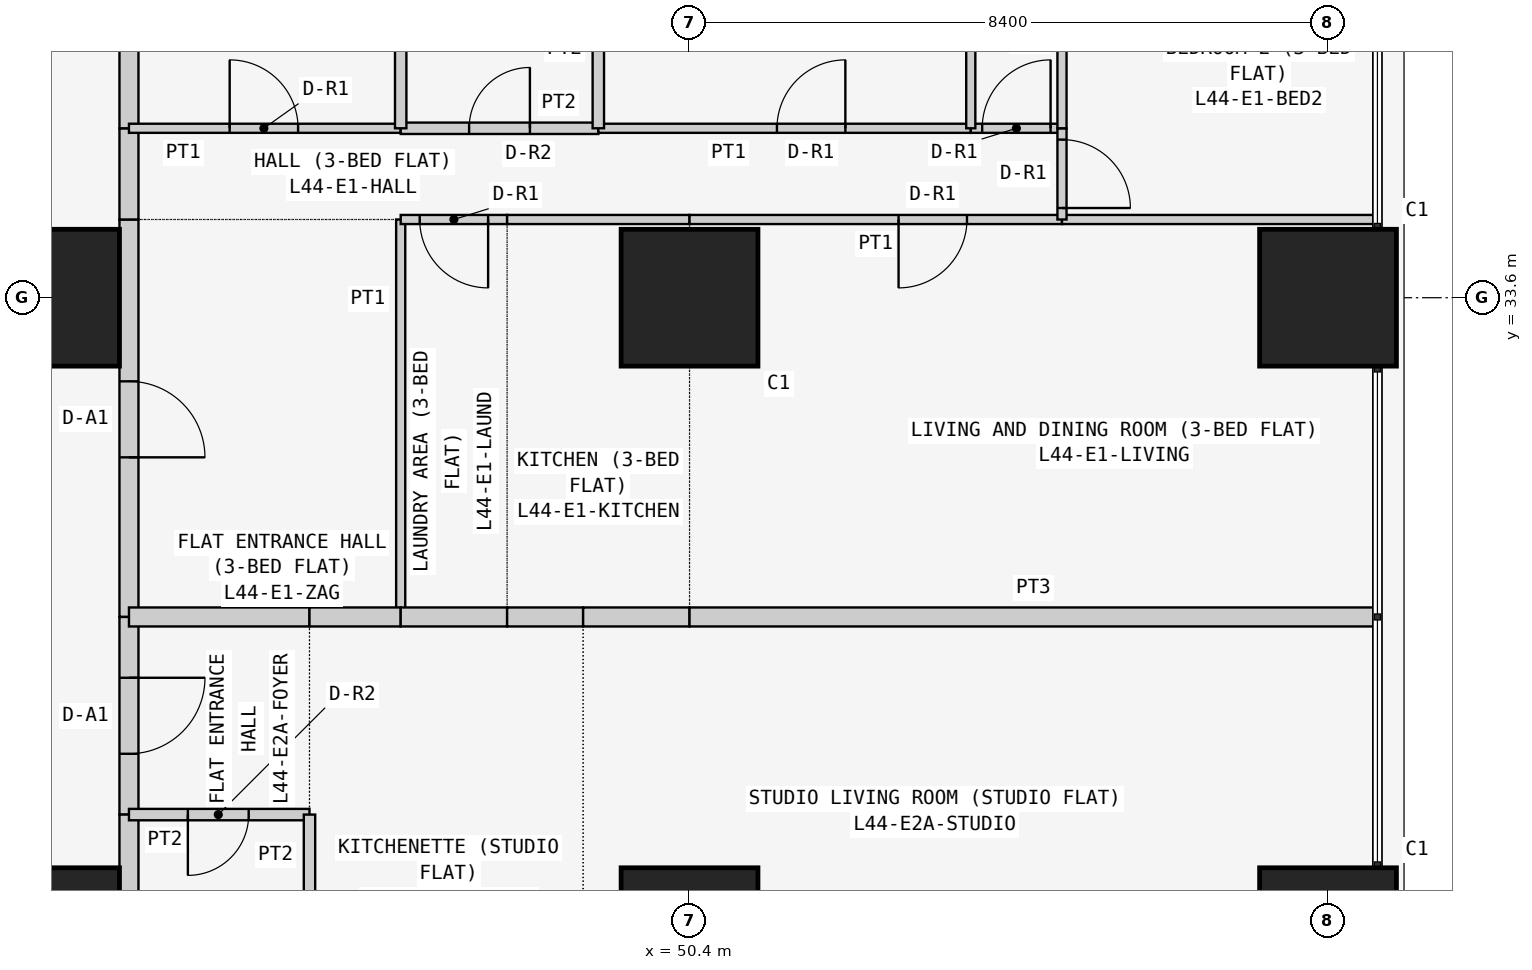
"""IFC4 building model, lengths in metres.
Left out: names, types, materials, properties, quantities, classifications, styles, units other than length and angle.
Written with IfcOpenShell. Run it as: python <this file> out.ifc"""

import sys

from ifc_helpers import new_model, si_unit, direction, frame, frame_2d, origin, origin_2d, place, context, subcontext, project, spatial, rectangle, extrude, element, fill, save


model = new_model("IFC4")
c1 = context("Model", 3, precision=1e-05, world=origin(), true_north=direction((0.0, 1.0)))
c2 = subcontext(c1, "Body", "Model", "MODEL_VIEW")
j1 = project(units=[si_unit("LENGTHUNIT", "METRE"), si_unit("PLANEANGLEUNIT", "RADIAN")], contexts=[c1])
p1 = place(None, origin())
s1 = spatial("IfcSite", under=j1, at=p1, CompositionType="ELEMENT")
p2 = place(p1, origin())
s2 = spatial("IfcBuilding", under=s1, at=p2, CompositionType="ELEMENT")
p3 = place(p2, frame((0.0, 0.0, 170.1)))
s3 = spatial("IfcBuildingStorey", under=s2, at=p3, CompositionType="ELEMENT", Elevation=170.1)
for number, where, z_axis, x_axis in (
    (1, (42.0, 25.2, 0.0), (0.0, 0.0, 1.0), (1.0, 0.0, 0.0)),
    (2, (42.0, 33.6, 0.0), (0.0, 0.0, 1.0), (1.0, 0.0, 0.0)),
    (3, (50.4, 25.2, 0.0), (0.0, 0.0, 1.0), (1.0, 0.0, 0.0)),
    (4, (50.4, 33.6, 0.0), (0.0, 0.0, 1.0), (1.0, 0.0, 0.0)),
    (5, (58.8, 25.2, 0.0), (0.0, 0.0, 1.0), (1.0, 0.0, 0.0)),
    (6, (58.8, 33.6, 0.0), (0.0, 0.0, 1.0), (1.0, 0.0, 0.0)),
):
    element("IfcColumn", number, at=place(p3, frame(where, z_axis=z_axis, x_axis=x_axis)), inside=s3, PredefinedType="COLUMN", context=c2, shape_type="SweptSolid", body=[
        extrude(rectangle(XDim=1.8, YDim=1.8, at=origin_2d()), origin(), (0.0, 0.0, 1.0), 3.6),
    ])
p4 = place(p3, frame((43.025, 34.629, 0.0), z_axis=(0.0, 0.0, 1.0), x_axis=(0.0, -1.0, 0.0)))
e7 = element("IfcWall", 7, at=p4, inside=s3, PredefinedType="PARTITIONING", context=c2, shape_type="SweptSolid", body=[
    extrude(rectangle(XDim=5.229, YDim=0.25, at=frame_2d((2.615, 0.0))), origin(), (0.0, 0.0, 1.0), 3.45),
])
p5 = place(p4, frame((2.129, 0.0, 0.0)))
e8 = element("IfcOpeningElement", 8, at=p5, cuts=e7, PredefinedType="OPENING", context=c2, shape_type="SweptSolid", body=[
    extrude(rectangle(XDim=1.0, YDim=2.1, at=frame_2d((0.5, 1.05))), frame((0.0, 0.135, 0.0), z_axis=(0.0, -1.0, 0.0), x_axis=(1.0, 0.0, 0.0)), (0.0, 0.0, 1.0), 0.27),
])
p6 = place(p3, frame((43.025, 35.829, 0.0), z_axis=(0.0, 0.0, 1.0), x_axis=(0.0, -1.0, 0.0)))
e9 = element("IfcWall", 9, at=p6, inside=s3, PredefinedType="PARTITIONING", context=c2, shape_type="SweptSolid", body=[
    extrude(rectangle(XDim=1.2, YDim=0.25, at=frame_2d((0.6, 0.0))), origin(), (0.0, 0.0, 1.0), 3.45),
])
p7 = place(p3, frame((43.025, 42.7, 0.0), z_axis=(0.0, 0.0, 1.0), x_axis=(0.0, -1.0, 0.0)))
e10 = element("IfcWall", 10, at=p7, inside=s3, PredefinedType="PARTITIONING", context=c2, shape_type="SweptSolid", body=[
    extrude(rectangle(XDim=6.871, YDim=0.25, at=frame_2d((3.436, 0.0))), origin(), (0.0, 0.0, 1.0), 3.45),
])
p8 = place(p3, frame((43.025, 29.4, 0.0), z_axis=(0.0, 0.0, 1.0), x_axis=(0.0, -1.0, 0.0)))
e11 = element("IfcWall", 11, at=p8, inside=s3, PredefinedType="PARTITIONING", context=c2, shape_type="SweptSolid", body=[
    extrude(rectangle(XDim=2.6, YDim=0.25, at=frame_2d((1.3, 0.0))), origin(), (0.0, 0.0, 1.0), 3.45),
])
p9 = place(p8, frame((0.8, 0.0, 0.0)))
e12 = element("IfcOpeningElement", 12, at=p9, cuts=e11, PredefinedType="OPENING", context=c2, shape_type="SweptSolid", body=[
    extrude(rectangle(XDim=1.0, YDim=2.1, at=frame_2d((0.5, 1.05))), frame((0.0, 0.135, 0.0), z_axis=(0.0, -1.0, 0.0), x_axis=(1.0, 0.0, 0.0)), (0.0, 0.0, 1.0), 0.27),
])
p10 = place(p3, frame((43.025, 26.8, 0.0), z_axis=(0.0, 0.0, 1.0), x_axis=(0.0, -1.0, 0.0)))
e13 = element("IfcWall", 13, at=p10, inside=s3, PredefinedType="PARTITIONING", context=c2, shape_type="SweptSolid", body=[
    extrude(rectangle(XDim=2.629, YDim=0.25, at=frame_2d((1.314, 0.0))), origin(), (0.0, 0.0, 1.0), 3.45),
])
p11 = place(p3, frame((46.6, 29.4, 0.0), z_axis=(0.0, 0.0, 1.0), x_axis=(0.0, 1.0, 0.0)))
e14 = element("IfcWall", 14, at=p11, inside=s3, PredefinedType="PARTITIONING", context=c2, shape_type="SweptSolid", body=[
    extrude(rectangle(XDim=5.229, YDim=0.12, at=frame_2d((2.615, 0.0))), origin(), (0.0, 0.0, 1.0), 3.45),
])
p12 = place(p3, frame((43.025, 29.4, 0.0), z_axis=(0.0, 0.0, 1.0), x_axis=(1.0, 0.0, 0.0)))
e15 = element("IfcWall", 15, at=p12, inside=s3, PredefinedType="PARTITIONING", context=c2, shape_type="SweptSolid", body=[
    extrude(rectangle(XDim=2.375, YDim=0.25, at=frame_2d((1.188, 0.0))), origin(), (0.0, 0.0, 1.0), 3.45),
])
p13 = place(p3, frame((45.4, 29.4, 0.0), z_axis=(0.0, 0.0, 1.0), x_axis=(1.0, 0.0, 0.0)))
e16 = element("IfcWall", 16, at=p13, inside=s3, PredefinedType="PARTITIONING", context=c2, shape_type="SweptSolid", body=[
    extrude(rectangle(XDim=1.2, YDim=0.25, at=frame_2d((0.6, 0.0))), origin(), (0.0, 0.0, 1.0), 3.45),
])
p14 = place(p3, frame((48.0, 34.629, 0.0), z_axis=(0.0, 0.0, 1.0), x_axis=(-1.0, 0.0, 0.0)))
e17 = element("IfcWall", 17, at=p14, inside=s3, PredefinedType="PARTITIONING", context=c2, shape_type="SweptSolid", body=[
    extrude(rectangle(XDim=1.4, YDim=0.12, at=frame_2d((0.7, 0.0))), origin(), (0.0, 0.0, 1.0), 3.45),
])
p15 = place(p14, frame((0.25, 0.0, 0.0)))
e18 = element("IfcOpeningElement", 18, at=p15, cuts=e17, PredefinedType="OPENING", context=c2, shape_type="SweptSolid", body=[
    extrude(rectangle(XDim=0.9, YDim=2.1, at=frame_2d((0.45, 1.05))), frame((0.0, 0.07, 0.0), z_axis=(0.0, -1.0, 0.0), x_axis=(1.0, 0.0, 0.0)), (0.0, 0.0, 1.0), 0.14),
])
p16 = place(p3, frame((46.6, 29.4, 0.0), z_axis=(0.0, 0.0, 1.0), x_axis=(1.0, 0.0, 0.0)))
e19 = element("IfcWall", 19, at=p16, inside=s3, PredefinedType="PARTITIONING", context=c2, shape_type="SweptSolid", body=[
    extrude(rectangle(XDim=1.4, YDim=0.25, at=frame_2d((0.7, 0.0))), origin(), (0.0, 0.0, 1.0), 3.45),
])
p17 = place(p3, frame((50.4, 34.629, 0.0), z_axis=(0.0, 0.0, 1.0), x_axis=(-1.0, 0.0, 0.0)))
e20 = element("IfcWall", 20, at=p17, inside=s3, PredefinedType="PARTITIONING", context=c2, shape_type="SweptSolid", body=[
    extrude(rectangle(XDim=2.4, YDim=0.12, at=frame_2d((1.2, 0.0))), origin(), (0.0, 0.0, 1.0), 3.45),
])
p18 = place(p3, frame((48.0, 29.4, 0.0), z_axis=(0.0, 0.0, 1.0), x_axis=(1.0, 0.0, 0.0)))
e21 = element("IfcWall", 21, at=p18, inside=s3, PredefinedType="PARTITIONING", context=c2, shape_type="SweptSolid", body=[
    extrude(rectangle(XDim=1.0, YDim=0.25, at=frame_2d((0.5, 0.0))), origin(), (0.0, 0.0, 1.0), 3.45),
])
p19 = place(p3, frame((49.0, 29.4, 0.0), z_axis=(0.0, 0.0, 1.0), x_axis=(1.0, 0.0, 0.0)))
e22 = element("IfcWall", 22, at=p19, inside=s3, PredefinedType="PARTITIONING", context=c2, shape_type="SweptSolid", body=[
    extrude(rectangle(XDim=1.4, YDim=0.25, at=frame_2d((0.7, 0.0))), origin(), (0.0, 0.0, 1.0), 3.45),
])
p20 = place(p3, frame((55.3, 34.629, 0.0), z_axis=(0.0, 0.0, 1.0), x_axis=(-1.0, 0.0, 0.0)))
e23 = element("IfcWall", 23, at=p20, inside=s3, PredefinedType="PARTITIONING", context=c2, shape_type="SweptSolid", body=[
    extrude(rectangle(XDim=4.9, YDim=0.12, at=frame_2d((2.45, 0.0))), origin(), (0.0, 0.0, 1.0), 3.45),
])
p21 = place(p20, frame((1.25, 0.0, 0.0)))
e24 = element("IfcOpeningElement", 24, at=p21, cuts=e23, PredefinedType="OPENING", context=c2, shape_type="SweptSolid", body=[
    extrude(rectangle(XDim=0.9, YDim=2.1, at=frame_2d((0.45, 1.05))), frame((0.0, 0.07, 0.0), z_axis=(0.0, -1.0, 0.0), x_axis=(1.0, 0.0, 0.0)), (0.0, 0.0, 1.0), 0.14),
])
p22 = place(p3, frame((59.45, 34.629, 0.0), z_axis=(0.0, 0.0, 1.0), x_axis=(-1.0, 0.0, 0.0)))
e25 = element("IfcWall", 25, at=p22, inside=s3, PredefinedType="PARTITIONING", context=c2, shape_type="SweptSolid", body=[
    extrude(rectangle(XDim=4.15, YDim=0.12, at=frame_2d((2.075, 0.0))), origin(), (0.0, 0.0, 1.0), 3.45),
])
p23 = place(p3, frame((50.4, 29.4, 0.0), z_axis=(0.0, 0.0, 1.0), x_axis=(1.0, 0.0, 0.0)))
e26 = element("IfcWall", 26, at=p23, inside=s3, PredefinedType="PARTITIONING", context=c2, shape_type="SweptSolid", body=[
    extrude(rectangle(XDim=9.05, YDim=0.25, at=frame_2d((4.525, 0.0))), origin(), (0.0, 0.0, 1.0), 3.45),
])
p24 = place(p3, frame((46.6, 35.829, 0.0), z_axis=(0.0, 0.0, 1.0), x_axis=(-1.0, 0.0, 0.0)))
e27 = element("IfcWall", 27, at=p24, inside=s3, PredefinedType="PARTITIONING", context=c2, shape_type="SweptSolid", body=[
    extrude(rectangle(XDim=3.575, YDim=0.12, at=frame_2d((1.788, 0.0))), origin(), (0.0, 0.0, 1.0), 3.45),
])
p25 = place(p24, frame((1.35, 0.0, 0.0)))
e28 = element("IfcOpeningElement", 28, at=p25, cuts=e27, PredefinedType="OPENING", context=c2, shape_type="SweptSolid", body=[
    extrude(rectangle(XDim=0.9, YDim=2.1, at=frame_2d((0.45, 1.05))), frame((0.0, 0.07, 0.0), z_axis=(0.0, -1.0, 0.0), x_axis=(1.0, 0.0, 0.0)), (0.0, 0.0, 1.0), 0.14),
])
p26 = place(p3, frame((49.2, 35.829, 0.0), z_axis=(0.0, 0.0, 1.0), x_axis=(-1.0, 0.0, 0.0)))
e29 = element("IfcWall", 29, at=p26, inside=s3, PredefinedType="PARTITIONING", context=c2, shape_type="SweptSolid", body=[
    extrude(rectangle(XDim=2.6, YDim=0.15, at=frame_2d((1.3, 0.0))), origin(), (0.0, 0.0, 1.0), 3.45),
])
p27 = place(p26, frame((0.9, 0.0, 0.0)))
e30 = element("IfcOpeningElement", 30, at=p27, cuts=e29, PredefinedType="OPENING", context=c2, shape_type="SweptSolid", body=[
    extrude(rectangle(XDim=0.8, YDim=2.1, at=frame_2d((0.4, 1.05))), frame((0.0, 0.085, 0.0), z_axis=(0.0, -1.0, 0.0), x_axis=(1.0, 0.0, 0.0)), (0.0, 0.0, 1.0), 0.17),
])
p28 = place(p3, frame((54.1, 35.829, 0.0), z_axis=(0.0, 0.0, 1.0), x_axis=(-1.0, 0.0, 0.0)))
e31 = element("IfcWall", 31, at=p28, inside=s3, PredefinedType="PARTITIONING", context=c2, shape_type="SweptSolid", body=[
    extrude(rectangle(XDim=4.9, YDim=0.12, at=frame_2d((2.45, 0.0))), origin(), (0.0, 0.0, 1.0), 3.45),
])
p29 = place(p28, frame((1.65, 0.0, 0.0)))
e32 = element("IfcOpeningElement", 32, at=p29, cuts=e31, PredefinedType="OPENING", context=c2, shape_type="SweptSolid", body=[
    extrude(rectangle(XDim=0.9, YDim=2.1, at=frame_2d((0.45, 1.05))), frame((0.0, 0.07, 0.0), z_axis=(0.0, -1.0, 0.0), x_axis=(1.0, 0.0, 0.0)), (0.0, 0.0, 1.0), 0.14),
])
p30 = place(p3, frame((55.3, 35.829, 0.0), z_axis=(0.0, 0.0, 1.0), x_axis=(-1.0, 0.0, 0.0)))
e33 = element("IfcWall", 33, at=p30, inside=s3, PredefinedType="PARTITIONING", context=c2, shape_type="SweptSolid", body=[
    extrude(rectangle(XDim=1.2, YDim=0.12, at=frame_2d((0.6, 0.0))), origin(), (0.0, 0.0, 1.0), 3.45),
])
p31 = place(p30, frame((0.15, 0.0, 0.0)))
e34 = element("IfcOpeningElement", 34, at=p31, cuts=e33, PredefinedType="OPENING", context=c2, shape_type="SweptSolid", body=[
    extrude(rectangle(XDim=0.9, YDim=2.1, at=frame_2d((0.45, 1.05))), frame((0.0, 0.07, 0.0), z_axis=(0.0, -1.0, 0.0), x_axis=(1.0, 0.0, 0.0)), (0.0, 0.0, 1.0), 0.14),
])
p32 = place(p3, frame((55.3, 34.629, 0.0), z_axis=(0.0, 0.0, 1.0), x_axis=(0.0, 1.0, 0.0)))
e35 = element("IfcWall", 35, at=p32, inside=s3, PredefinedType="PARTITIONING", context=c2, shape_type="SweptSolid", body=[
    extrude(rectangle(XDim=1.2, YDim=0.12, at=frame_2d((0.6, 0.0))), origin(), (0.0, 0.0, 1.0), 3.45),
])
p33 = place(p32, frame((0.151, 0.0, 0.0)))
e36 = element("IfcOpeningElement", 36, at=p33, cuts=e35, PredefinedType="OPENING", context=c2, shape_type="SweptSolid", body=[
    extrude(rectangle(XDim=0.9, YDim=2.1, at=frame_2d((0.45, 1.05))), frame((0.0, 0.07, 0.0), z_axis=(0.0, -1.0, 0.0), x_axis=(1.0, 0.0, 0.0)), (0.0, 0.0, 1.0), 0.14),
])
for number, where, z_axis, x_axis in (
    (37, (46.6, 35.829, 0.0), (0.0, 0.0, 1.0), (0.0, 1.0, 0.0)),
    (38, (49.2, 35.829, 0.0), (0.0, 0.0, 1.0), (0.0, 1.0, 0.0)),
):
    element("IfcWall", number, at=place(p3, frame(where, z_axis=z_axis, x_axis=x_axis)), inside=s3, PredefinedType="PARTITIONING", context=c2, shape_type="SweptSolid", body=[
        extrude(rectangle(XDim=2.971, YDim=0.15, at=frame_2d((1.485, 0.0))), origin(), (0.0, 0.0, 1.0), 3.45),
    ])
for number, where, z_axis, x_axis in (
    (39, (54.1, 35.829, 0.0), (0.0, 0.0, 1.0), (0.0, 1.0, 0.0)),
    (40, (55.3, 35.829, 0.0), (0.0, 0.0, 1.0), (0.0, 1.0, 0.0)),
):
    element("IfcWall", number, at=place(p3, frame(where, z_axis=z_axis, x_axis=x_axis)), inside=s3, PredefinedType="PARTITIONING", context=c2, shape_type="SweptSolid", body=[
        extrude(rectangle(XDim=2.285, YDim=0.12, at=frame_2d((1.143, 0.0))), origin(), (0.0, 0.0, 1.0), 3.45),
    ])
p34 = place(p3, frame((45.4, 26.8, 0.0), z_axis=(0.0, 0.0, 1.0), x_axis=(-1.0, 0.0, 0.0)))
e41 = element("IfcWall", 41, at=p34, inside=s3, PredefinedType="PARTITIONING", context=c2, shape_type="SweptSolid", body=[
    extrude(rectangle(XDim=2.375, YDim=0.15, at=frame_2d((1.188, 0.0))), origin(), (0.0, 0.0, 1.0), 3.45),
])
p35 = place(p34, frame((0.8, 0.0, 0.0)))
e42 = element("IfcOpeningElement", 42, at=p35, cuts=e41, PredefinedType="OPENING", context=c2, shape_type="SweptSolid", body=[
    extrude(rectangle(XDim=0.8, YDim=2.1, at=frame_2d((0.4, 1.05))), frame((0.0, 0.085, 0.0), z_axis=(0.0, -1.0, 0.0), x_axis=(1.0, 0.0, 0.0)), (0.0, 0.0, 1.0), 0.17),
])
p36 = place(p3, frame((45.4, 26.8, 0.0), z_axis=(0.0, 0.0, 1.0), x_axis=(0.0, -1.0, 0.0)))
e43 = element("IfcWall", 43, at=p36, inside=s3, PredefinedType="PARTITIONING", context=c2, shape_type="SweptSolid", body=[
    extrude(rectangle(XDim=2.629, YDim=0.15, at=frame_2d((1.314, 0.0))), origin(), (0.0, 0.0, 1.0), 3.45),
])
p37 = place(p5, origin())
e44 = element("IfcDoor", 44, at=p37, inside=s3, OperationType="SINGLE_SWING_RIGHT", PredefinedType="DOOR", context=c2, shape_type="SweptSolid", body=[
    extrude(rectangle(XDim=1.0, YDim=2.1, at=frame_2d((0.5, 1.05))), frame((0.0, 0.025, 0.0), z_axis=(0.0, -1.0, 0.0), x_axis=(1.0, 0.0, 0.0)), (0.0, 0.0, 1.0), 0.05),
])
fill(e8, e44)
p38 = place(p15, origin())
e45 = element("IfcDoor", 45, at=p38, inside=s3, OperationType="SINGLE_SWING_LEFT", PredefinedType="DOOR", context=c2, shape_type="SweptSolid", body=[
    extrude(rectangle(XDim=0.9, YDim=2.1, at=frame_2d((0.45, 1.05))), frame((0.0, 0.025, 0.0), z_axis=(0.0, -1.0, 0.0), x_axis=(1.0, 0.0, 0.0)), (0.0, 0.0, 1.0), 0.05),
])
fill(e18, e45)
p39 = place(p21, origin())
e46 = element("IfcDoor", 46, at=p39, inside=s3, OperationType="SINGLE_SWING_RIGHT", PredefinedType="DOOR", context=c2, shape_type="SweptSolid", body=[
    extrude(rectangle(XDim=0.9, YDim=2.1, at=frame_2d((0.45, 1.05))), frame((0.0, 0.025, 0.0), z_axis=(0.0, -1.0, 0.0), x_axis=(1.0, 0.0, 0.0)), (0.0, 0.0, 1.0), 0.05),
])
fill(e24, e46)
p40 = place(p25, frame((0.9, 0.0, 0.0), z_axis=(0.0, 0.0, 1.0), x_axis=(-1.0, 0.0, 0.0)))
e47 = element("IfcDoor", 47, at=p40, inside=s3, OperationType="SINGLE_SWING_LEFT", PredefinedType="DOOR", context=c2, shape_type="SweptSolid", body=[
    extrude(rectangle(XDim=0.9, YDim=2.1, at=frame_2d((0.45, 1.05))), frame((0.0, 0.025, 0.0), z_axis=(0.0, -1.0, 0.0), x_axis=(1.0, 0.0, 0.0)), (0.0, 0.0, 1.0), 0.05),
])
fill(e28, e47)
p41 = place(p27, frame((0.8, 0.0, 0.0), z_axis=(0.0, 0.0, 1.0), x_axis=(-1.0, 0.0, 0.0)))
e48 = element("IfcDoor", 48, at=p41, inside=s3, OperationType="SINGLE_SWING_RIGHT", PredefinedType="DOOR", context=c2, shape_type="SweptSolid", body=[
    extrude(rectangle(XDim=0.8, YDim=2.1, at=frame_2d((0.4, 1.05))), frame((0.0, 0.025, 0.0), z_axis=(0.0, -1.0, 0.0), x_axis=(1.0, 0.0, 0.0)), (0.0, 0.0, 1.0), 0.05),
])
fill(e30, e48)
p42 = place(p29, frame((0.9, 0.0, 0.0), z_axis=(0.0, 0.0, 1.0), x_axis=(-1.0, 0.0, 0.0)))
e49 = element("IfcDoor", 49, at=p42, inside=s3, OperationType="SINGLE_SWING_RIGHT", PredefinedType="DOOR", context=c2, shape_type="SweptSolid", body=[
    extrude(rectangle(XDim=0.9, YDim=2.1, at=frame_2d((0.45, 1.05))), frame((0.0, 0.025, 0.0), z_axis=(0.0, -1.0, 0.0), x_axis=(1.0, 0.0, 0.0)), (0.0, 0.0, 1.0), 0.05),
])
fill(e32, e49)
p43 = place(p31, frame((0.9, 0.0, 0.0), z_axis=(0.0, 0.0, 1.0), x_axis=(-1.0, 0.0, 0.0)))
e50 = element("IfcDoor", 50, at=p43, inside=s3, OperationType="SINGLE_SWING_RIGHT", PredefinedType="DOOR", context=c2, shape_type="SweptSolid", body=[
    extrude(rectangle(XDim=0.9, YDim=2.1, at=frame_2d((0.45, 1.05))), frame((0.0, 0.025, 0.0), z_axis=(0.0, -1.0, 0.0), x_axis=(1.0, 0.0, 0.0)), (0.0, 0.0, 1.0), 0.05),
])
fill(e34, e50)
p44 = place(p33, frame((0.9, 0.0, 0.0), z_axis=(0.0, 0.0, 1.0), x_axis=(-1.0, 0.0, 0.0)))
e51 = element("IfcDoor", 51, at=p44, inside=s3, OperationType="SINGLE_SWING_RIGHT", PredefinedType="DOOR", context=c2, shape_type="SweptSolid", body=[
    extrude(rectangle(XDim=0.9, YDim=2.1, at=frame_2d((0.45, 1.05))), frame((0.0, 0.025, 0.0), z_axis=(0.0, -1.0, 0.0), x_axis=(1.0, 0.0, 0.0)), (0.0, 0.0, 1.0), 0.05),
])
fill(e36, e51)
p45 = place(p9, origin())
e52 = element("IfcDoor", 52, at=p45, inside=s3, OperationType="SINGLE_SWING_LEFT", PredefinedType="DOOR", context=c2, shape_type="SweptSolid", body=[
    extrude(rectangle(XDim=1.0, YDim=2.1, at=frame_2d((0.5, 1.05))), frame((0.0, 0.025, 0.0), z_axis=(0.0, -1.0, 0.0), x_axis=(1.0, 0.0, 0.0)), (0.0, 0.0, 1.0), 0.05),
])
fill(e12, e52)
p46 = place(p35, origin())
e53 = element("IfcDoor", 53, at=p46, inside=s3, OperationType="SINGLE_SWING_RIGHT", PredefinedType="DOOR", context=c2, shape_type="SweptSolid", body=[
    extrude(rectangle(XDim=0.8, YDim=2.1, at=frame_2d((0.4, 1.05))), frame((0.0, 0.025, 0.0), z_axis=(0.0, -1.0, 0.0), x_axis=(1.0, 0.0, 0.0)), (0.0, 0.0, 1.0), 0.05),
])
fill(e42, e53)
save(model, sys.argv[1])
